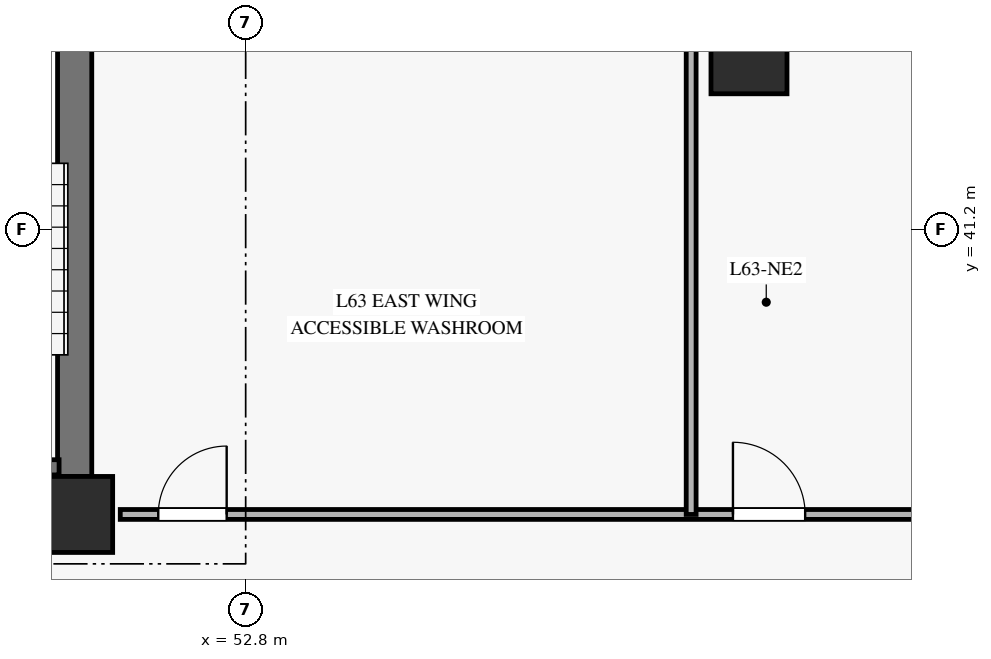
"""IFC4 building model, lengths in metres.
Left out: names, types, materials, properties, quantities, classifications, styles, units other than length and angle.
Written with IfcOpenShell. Run it as: python <this file> out.ifc"""

import sys

from ifc_helpers import new_model, si_unit, direction, frame, frame_2d, origin, origin_2d, place, context, subcontext, project, spatial, rectangle, hollow_rectangle, extrude, source, transform, mapped, element, fill, save


model = new_model("IFC4")
c1 = context("Model", 3, precision=1e-05, world=origin(), true_north=direction((0.0, 1.0)))
c2 = subcontext(c1, "Body", "Model", "MODEL_VIEW")
j1 = project(units=[si_unit("LENGTHUNIT", "METRE"), si_unit("PLANEANGLEUNIT", "RADIAN")], contexts=[c1])
p1 = place(None, origin())
s1 = spatial("IfcSite", under=j1, at=p1, CompositionType="ELEMENT")
p2 = place(p1, origin())
s2 = spatial("IfcBuilding", under=s1, at=p2, CompositionType="ELEMENT")
p3 = place(p2, frame((0.0, 0.0, 248.5)))
s3 = spatial("IfcBuildingStorey", under=s2, at=p3, CompositionType="ELEMENT", Elevation=248.5)
m1 = source(origin(), c2, "Body", "SweptSolid", [
    extrude(rectangle(XDim=1.0, YDim=1.0, at=origin_2d()), origin(), (0.0, 0.0, 1.0), 3.185),
])
p4 = place(p3, frame((50.55, 37.45, 0.0), z_axis=(0.0, 0.0, 1.0), x_axis=(1.0, 0.0, 0.0)))
e1 = element("IfcColumn", 1, at=p4, inside=s3, PredefinedType="PILASTER", context=c2, shape_type="MappedRepresentation", body=[
    mapped(m1, transform((0.0, 0.0, 0.0), x_axis=(1.0, 0.0, 0.0), y_axis=(0.0, 1.0, 0.0), z_axis=(0.0, 0.0, 1.0), scale=1.0)),
])
p5 = place(p3, frame((50.55, 37.95, 0.0), z_axis=(0.0, 0.0, 1.0), x_axis=(0.0, 1.0, 0.0)))
e2 = element("IfcWall", 2, at=p5, inside=s3, PredefinedType="SHEAR", context=c2, shape_type="SweptSolid", body=[
    extrude(rectangle(XDim=8.1, YDim=0.45, at=frame_2d((4.05, 0.0))), origin(), (0.0, 0.0, 1.0), 3.185),
])
m2 = source(origin(), c2, "Body", "SweptSolid", [
    extrude(hollow_rectangle(XDim=1.0, YDim=1.0, WallThickness=0.045, at=origin_2d()), origin(), (0.0, 0.0, 1.0), 3.185),
])
p6 = place(p3, frame((59.422, 43.485, 0.0), z_axis=(0.0, 0.0, 1.0), x_axis=(1.0, 0.0, 0.0)))
e3 = element("IfcColumn", 3, at=p6, inside=s3, PredefinedType="COLUMN", context=c2, shape_type="MappedRepresentation", body=[
    mapped(m2, transform((0.0, 0.0, 0.0), x_axis=(1.0, 0.0, 0.0), y_axis=(0.0, 1.0, 0.0), z_axis=(0.0, 0.0, 1.0), scale=1.0)),
])
p7 = place(p3, frame((62.037, 43.485, 0.0), z_axis=(0.0, 0.0, 1.0), x_axis=(-0.65001186438, 0.759924059472, 0.0)))
e4 = element("IfcWall", 4, at=p7, inside=s3, PredefinedType="SOLIDWALL", context=c2, shape_type="SweptSolid", body=[
    extrude(rectangle(XDim=3.638, YDim=0.3, at=frame_2d((1.819, 0.0))), origin(), (0.0, 0.0, 1.0), 2.815),
])
p8 = place(p7, frame((1.019, 0.0, 0.45)))
e5 = element("IfcOpeningElement", 5, at=p8, cuts=e4, PredefinedType="OPENING", context=c2, shape_type="SweptSolid", body=[
    extrude(rectangle(XDim=1.6, YDim=2.0, at=frame_2d((0.8, 1.0))), frame((0.0, 0.16, 0.0), z_axis=(0.0, -1.0, 0.0), x_axis=(1.0, 0.0, 0.0)), (0.0, 0.0, 1.0), 0.32),
])
p9 = place(p3, frame((47.44, 38.07, 0.0), z_axis=(0.0, 0.0, 1.0), x_axis=(1.0, 0.0, 0.0)))
e6 = element("IfcWall", 6, at=p9, inside=s3, PredefinedType="SOLIDWALL", context=c2, shape_type="SweptSolid", body=[
    extrude(rectangle(XDim=2.905, YDim=0.2, at=frame_2d((1.453, 0.0))), origin(), (0.0, 0.0, 1.0), 3.4),
])
p10 = place(p3, frame((51.15, 37.45, 0.0), z_axis=(0.0, 0.0, 1.0), x_axis=(1.0, 0.0, 0.0)))
e7 = element("IfcWall", 7, at=p10, inside=s3, PredefinedType="PARTITIONING", context=c2, shape_type="SweptSolid", body=[
    extrude(rectangle(XDim=10.887, YDim=0.13, at=frame_2d((5.444, 0.0))), origin(), (0.0, 0.0, 1.0), 2.82),
])
p11 = place(p10, frame((0.5, 0.0, 0.0)))
e8 = element("IfcOpeningElement", 8, at=p11, cuts=e7, PredefinedType="OPENING", context=c2, shape_type="SweptSolid", body=[
    extrude(rectangle(XDim=0.9, YDim=2.1, at=frame_2d((0.45, 1.05))), frame((0.0, 0.075, 0.0), z_axis=(0.0, -1.0, 0.0), x_axis=(1.0, 0.0, 0.0)), (0.0, 0.0, 1.0), 0.15),
])
p12 = place(p10, frame((8.061, 0.0, 0.0)))
e9 = element("IfcOpeningElement", 9, at=p12, cuts=e7, PredefinedType="OPENING", context=c2, shape_type="SweptSolid", body=[
    extrude(rectangle(XDim=0.95, YDim=2.1, at=frame_2d((0.475, 1.05))), frame((0.0, 0.075, 0.0), z_axis=(0.0, -1.0, 0.0), x_axis=(1.0, 0.0, 0.0)), (0.0, 0.0, 1.0), 0.15),
])
p13 = place(p3, frame((58.661, 37.45, 0.0), z_axis=(0.0, 0.0, 1.0), x_axis=(0.0, 1.0, 0.0)))
e10 = element("IfcWall", 10, at=p13, inside=s3, PredefinedType="PARTITIONING", context=c2, shape_type="SweptSolid", body=[
    extrude(rectangle(XDim=8.8, YDim=0.13, at=frame_2d((4.4, 0.0))), origin(), (0.0, 0.0, 1.0), 3.185),
])
m3 = source(origin(), c2, "Body", "SweptSolid", [
    extrude(rectangle(XDim=0.9, YDim=2.1, at=frame_2d((0.45, 1.05))), frame((0.0, 0.025, 0.0), z_axis=(0.0, -1.0, 0.0), x_axis=(1.0, 0.0, 0.0)), (0.0, 0.0, 1.0), 0.05),
])
p14 = place(p11, origin())
e11 = element("IfcDoor", 11, at=p14, inside=s3, OperationType="SINGLE_SWING_RIGHT", PredefinedType="DOOR", context=c2, shape_type="MappedRepresentation", body=[
    mapped(m3, transform((0.0, 0.0, 0.0), x_axis=(1.0, 0.0, 0.0), y_axis=(0.0, 1.0, 0.0), z_axis=(0.0, 0.0, 1.0), scale=1.0)),
])
fill(e8, e11)
m4 = source(origin(), c2, "Body", "SweptSolid", [
    extrude(rectangle(XDim=0.95, YDim=2.1, at=frame_2d((0.475, 1.05))), frame((0.0, 0.025, 0.0), z_axis=(0.0, -1.0, 0.0), x_axis=(1.0, 0.0, 0.0)), (0.0, 0.0, 1.0), 0.05),
])
p15 = place(p12, origin())
e12 = element("IfcDoor", 12, at=p15, inside=s3, OperationType="SINGLE_SWING_LEFT", PredefinedType="DOOR", context=c2, shape_type="MappedRepresentation", body=[
    mapped(m4, transform((0.0, 0.0, 0.0), x_axis=(1.0, 0.0, 0.0), y_axis=(0.0, 1.0, 0.0), z_axis=(0.0, 0.0, 1.0), scale=1.0)),
])
fill(e9, e12)
save(model, sys.argv[1])
